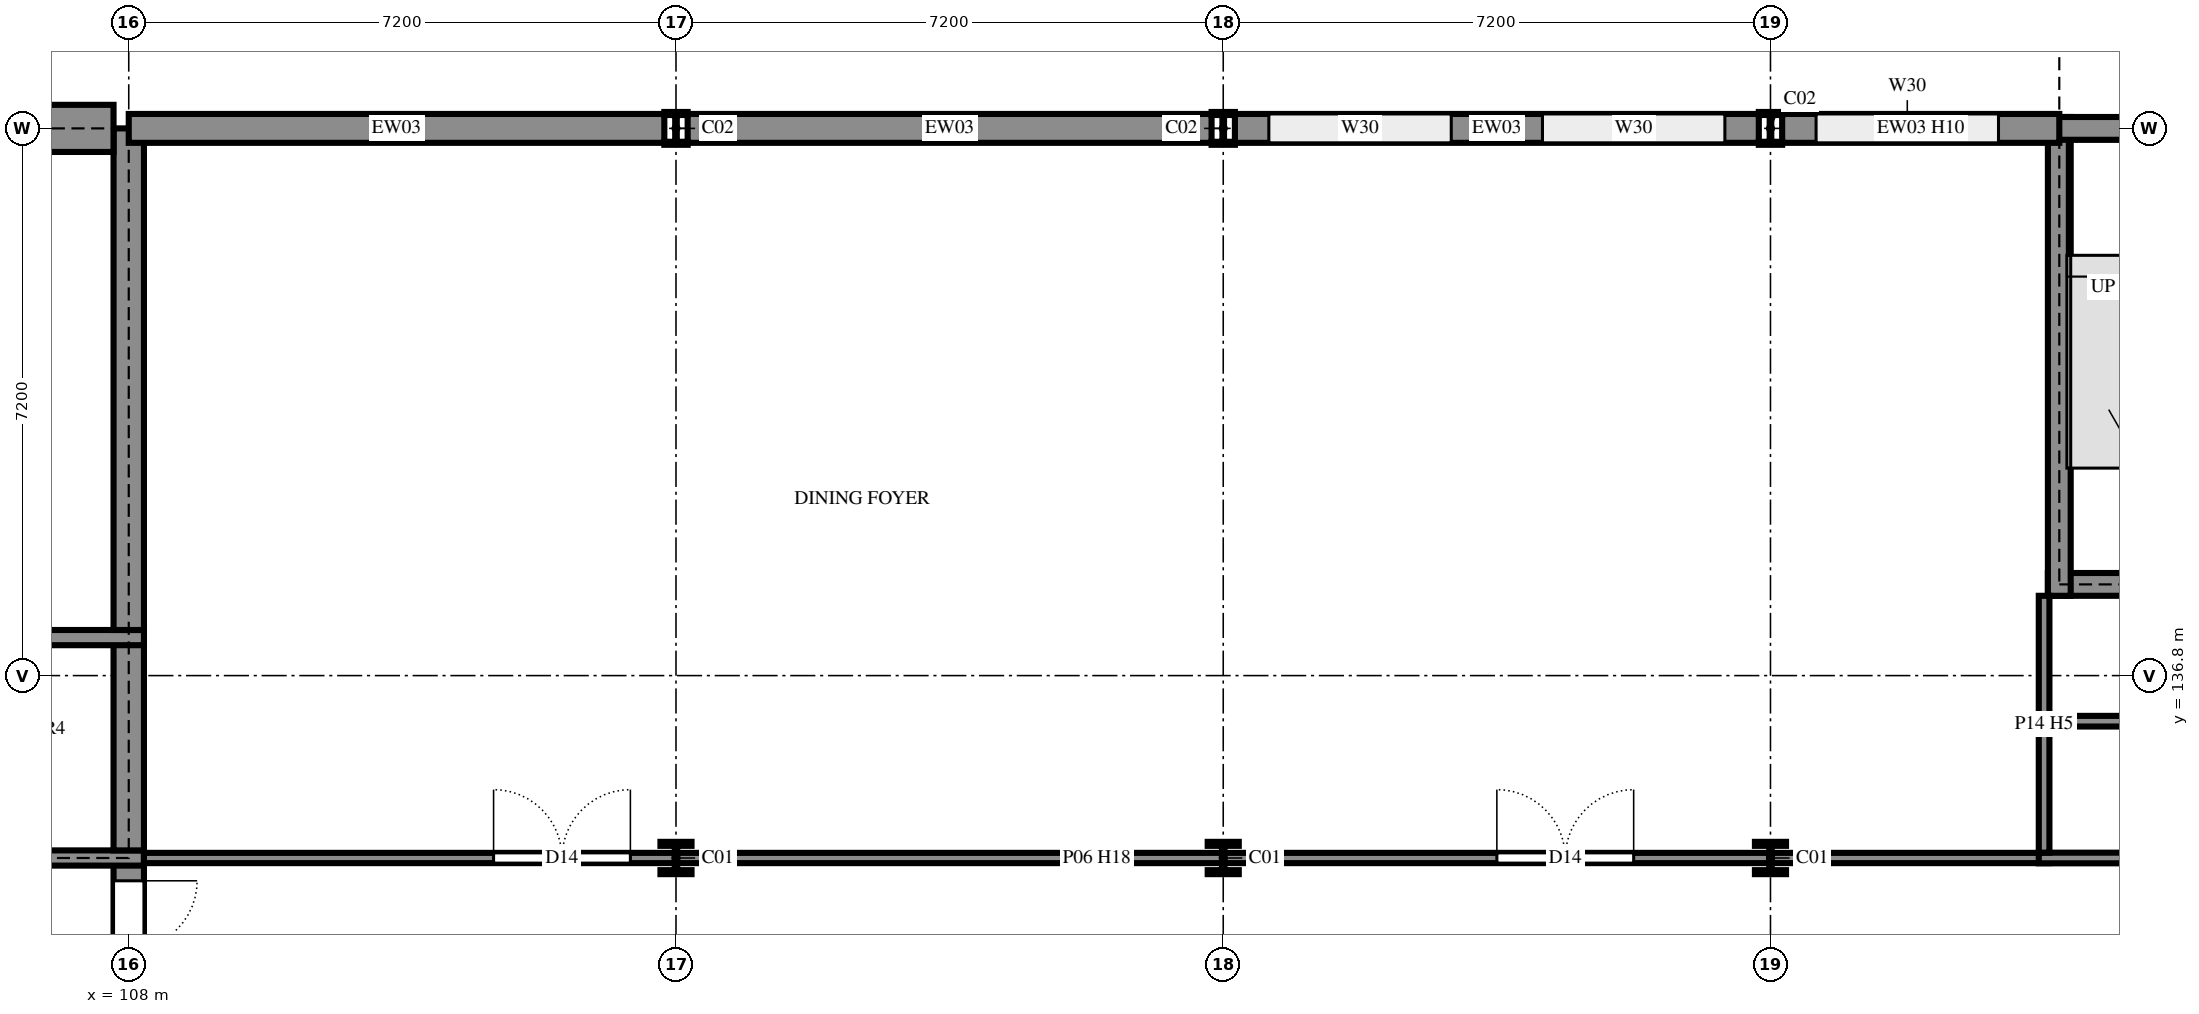
"""IFC4 building model, lengths in metres.
Left out: names, types, materials, properties, quantities, classifications, styles, units other than length and angle.
Written with IfcOpenShell. Run it as: python <this file> out.ifc"""

import sys

from ifc_helpers import new_model, si_unit, direction, frame, frame_2d, origin, origin_2d, place, context, subcontext, project, spatial, rectangle, i_section, extrude, element, fill, save


model = new_model("IFC4")
c1 = context("Model", 3, precision=1e-05, world=origin(), true_north=direction((0.0, 1.0)))
c2 = subcontext(c1, "Body", "Model", "MODEL_VIEW")
j1 = project(units=[si_unit("LENGTHUNIT", "METRE"), si_unit("PLANEANGLEUNIT", "RADIAN")], contexts=[c1])
p1 = place(None, origin())
s1 = spatial("IfcSite", under=j1, at=p1, CompositionType="ELEMENT")
p2 = place(p1, origin())
s2 = spatial("IfcBuilding", under=s1, at=p2, CompositionType="ELEMENT")
p3 = place(p2, frame((0.0, 0.0, 10.8)))
s3 = spatial("IfcBuildingStorey", under=s2, at=p3, CompositionType="ELEMENT", Elevation=10.8)
p4 = place(p3, frame((115.2, 134.4, 0.0), z_axis=(0.0, 0.0, 1.0), x_axis=(1.0, 0.0, 0.0)))
e1 = element("IfcColumn", 1, at=p4, inside=s3, PredefinedType="COLUMN", context=c2, shape_type="SweptSolid", body=[
    extrude(i_section(OverallWidth=0.409, OverallDepth=0.425, WebThickness=0.033, FlangeThickness=0.052, FilletRadius=0.015, at=origin_2d()), origin(), (0.0, 0.0, 1.0), 3.6),
])
p5 = place(p3, frame((115.2, 144.0, 0.0), z_axis=(0.0, 0.0, 1.0), x_axis=(1.0, 0.0, 0.0)))
e2 = element("IfcColumn", 2, at=p5, inside=s3, PredefinedType="COLUMN", context=c2, shape_type="SweptSolid", body=[
    extrude(i_section(OverallWidth=0.307, OverallDepth=0.432, WebThickness=0.021, FlangeThickness=0.04, FilletRadius=0.027, at=origin_2d()), origin(), (0.0, 0.0, 1.0), 3.6),
])
p6 = place(p3, frame((122.4, 134.4, 0.0), z_axis=(0.0, 0.0, 1.0), x_axis=(1.0, 0.0, 0.0)))
e3 = element("IfcColumn", 3, at=p6, inside=s3, PredefinedType="COLUMN", context=c2, shape_type="SweptSolid", body=[
    extrude(i_section(OverallWidth=0.409, OverallDepth=0.425, WebThickness=0.033, FlangeThickness=0.052, FilletRadius=0.015, at=origin_2d()), origin(), (0.0, 0.0, 1.0), 3.6),
])
p7 = place(p3, frame((122.4, 144.0, 0.0), z_axis=(0.0, 0.0, 1.0), x_axis=(1.0, 0.0, 0.0)))
e4 = element("IfcColumn", 4, at=p7, inside=s3, PredefinedType="COLUMN", context=c2, shape_type="SweptSolid", body=[
    extrude(i_section(OverallWidth=0.307, OverallDepth=0.432, WebThickness=0.021, FlangeThickness=0.04, FilletRadius=0.027, at=origin_2d()), origin(), (0.0, 0.0, 1.0), 3.6),
])
p8 = place(p3, frame((129.6, 134.4, 0.0), z_axis=(0.0, 0.0, 1.0), x_axis=(1.0, 0.0, 0.0)))
e5 = element("IfcColumn", 5, at=p8, inside=s3, PredefinedType="COLUMN", context=c2, shape_type="SweptSolid", body=[
    extrude(i_section(OverallWidth=0.409, OverallDepth=0.425, WebThickness=0.033, FlangeThickness=0.052, FilletRadius=0.015, at=origin_2d()), origin(), (0.0, 0.0, 1.0), 3.6),
])
p9 = place(p3, frame((129.6, 144.0, 0.0), z_axis=(0.0, 0.0, 1.0), x_axis=(1.0, 0.0, 0.0)))
e6 = element("IfcColumn", 6, at=p9, inside=s3, PredefinedType="COLUMN", context=c2, shape_type="SweptSolid", body=[
    extrude(i_section(OverallWidth=0.307, OverallDepth=0.432, WebThickness=0.021, FlangeThickness=0.04, FilletRadius=0.027, at=origin_2d()), origin(), (0.0, 0.0, 1.0), 3.6),
])
p10 = place(p3, frame((108.0, 132.0, 0.0), z_axis=(0.0, 0.0, 1.0), x_axis=(0.0, 1.0, 0.0)))
e7 = element("IfcWall", 7, at=p10, inside=s3, PredefinedType="SHEAR", context=c2, shape_type="SweptSolid", body=[
    extrude(rectangle(XDim=2.5, YDim=0.4, at=frame_2d((1.25, 0.0))), origin(), (0.0, 0.0, 1.0), 3.6),
])
p11 = place(p10, frame((0.3, 0.0, 0.0)))
e8 = element("IfcOpeningElement", 8, at=p11, cuts=e7, PredefinedType="OPENING", context=c2, shape_type="SweptSolid", body=[
    extrude(rectangle(XDim=1.8, YDim=2.1, at=frame_2d((0.9, 1.05))), frame((0.0, 0.21, 0.0), z_axis=(0.0, -1.0, 0.0), x_axis=(1.0, 0.0, 0.0)), (0.0, 0.0, 1.0), 0.42),
])
p12 = place(p3, frame((104.1, 134.4, 0.0), z_axis=(0.0, 0.0, 1.0), x_axis=(1.0, 0.0, 0.0)))
e9 = element("IfcWall", 9, at=p12, inside=s3, PredefinedType="SHEAR", context=c2, shape_type="SweptSolid", body=[
    extrude(rectangle(XDim=4.1, YDim=0.2, at=frame_2d((2.05, 0.0))), origin(), (0.0, 0.0, 1.0), 3.6),
])
p13 = place(p12, frame((1.475, 0.0, 0.0)))
e10 = element("IfcOpeningElement", 10, at=p13, cuts=e9, PredefinedType="OPENING", context=c2, shape_type="SweptSolid", body=[
    extrude(rectangle(XDim=0.85, YDim=2.1, at=frame_2d((0.425, 1.05))), frame((0.0, 0.11, 0.0), z_axis=(0.0, -1.0, 0.0), x_axis=(1.0, 0.0, 0.0)), (0.0, 0.0, 1.0), 0.22),
])
p14 = place(p3, frame((108.0, 134.5, 0.0), z_axis=(0.0, 0.0, 1.0), x_axis=(0.0, 1.0, 0.0)))
e11 = element("IfcWall", 11, at=p14, inside=s3, PredefinedType="SHEAR", context=c2, shape_type="SweptSolid", body=[
    extrude(rectangle(XDim=2.9, YDim=0.4, at=frame_2d((1.45, 0.0))), origin(), (0.0, 0.0, 1.0), 3.6),
])
p15 = place(p3, frame((108.2, 137.3, 0.0), z_axis=(0.0, 0.0, 1.0), x_axis=(-1.0, 0.0, 0.0)))
e12 = element("IfcWall", 12, at=p15, inside=s3, PredefinedType="SHEAR", context=c2, shape_type="SweptSolid", body=[
    extrude(rectangle(XDim=4.1, YDim=0.2, at=frame_2d((2.05, 0.0))), origin(), (0.0, 0.0, 1.0), 3.6),
])
p16 = place(p3, frame((108.0, 137.4, 0.0), z_axis=(0.0, 0.0, 1.0), x_axis=(0.0, 1.0, 0.0)))
e13 = element("IfcWall", 13, at=p16, inside=s3, PredefinedType="SHEAR", context=c2, shape_type="SweptSolid", body=[
    extrude(rectangle(XDim=6.6, YDim=0.4, at=frame_2d((3.3, 0.0))), origin(), (0.0, 0.0, 1.0), 3.6),
])
p17 = place(p3, frame((133.25, 138.0, 0.0), z_axis=(0.0, 0.0, 1.0), x_axis=(1.0, 0.0, 0.0)))
e14 = element("IfcWall", 14, at=p17, inside=s3, PredefinedType="SHEAR", context=c2, shape_type="SweptSolid", body=[
    extrude(rectangle(XDim=3.7, YDim=0.3, at=frame_2d((1.85, 0.0))), origin(), (0.0, 0.0, 1.0), 3.6),
])
p18 = place(p17, frame((1.25, 0.0, 0.0)))
e15 = element("IfcOpeningElement", 15, at=p18, cuts=e14, PredefinedType="OPENING", context=c2, shape_type="SweptSolid", body=[
    extrude(rectangle(XDim=1.0, YDim=2.1, at=frame_2d((0.5, 1.05))), frame((0.0, 0.16, 0.0), z_axis=(0.0, -1.0, 0.0), x_axis=(1.0, 0.0, 0.0)), (0.0, 0.0, 1.0), 0.32),
])
p19 = place(p3, frame((133.4, 144.15, 0.0), z_axis=(0.0, 0.0, 1.0), x_axis=(0.0, -1.0, 0.0)))
e16 = element("IfcWall", 16, at=p19, inside=s3, PredefinedType="SHEAR", context=c2, shape_type="SweptSolid", body=[
    extrude(rectangle(XDim=6.3, YDim=0.3, at=frame_2d((3.15, 0.0))), origin(), (0.0, 0.0, 1.0), 3.6),
])
p20 = place(p3, frame((136.95, 144.0, 0.0), z_axis=(0.0, 0.0, 1.0), x_axis=(-1.0, 0.0, 0.0)))
e17 = element("IfcWall", 17, at=p20, inside=s3, PredefinedType="SHEAR", context=c2, shape_type="SweptSolid", body=[
    extrude(rectangle(XDim=3.7, YDim=0.3, at=frame_2d((1.85, 0.0))), origin(), (0.0, 0.0, 1.0), 3.6),
])
p21 = place(p20, frame((1.25, 0.0, 0.6)))
e18 = element("IfcOpeningElement", 18, at=p21, cuts=e17, PredefinedType="OPENING", context=c2, shape_type="SweptSolid", body=[
    extrude(rectangle(XDim=0.9, YDim=2.1, at=frame_2d((0.45, 1.05))), frame((0.0, 0.16, 0.0), z_axis=(0.0, -1.0, 0.0), x_axis=(1.0, 0.0, 0.0)), (0.0, 0.0, 1.0), 0.32),
])
p22 = place(p3, frame((133.4, 144.0, 0.0), z_axis=(0.0, 0.0, 1.0), x_axis=(-1.0, 0.0, 0.0)))
e19 = element("IfcWall", 19, at=p22, inside=s3, PredefinedType="SOLIDWALL", context=c2, shape_type="SweptSolid", body=[
    extrude(rectangle(XDim=3.646, YDim=0.38, at=frame_2d((1.823, 0.0))), origin(), (0.0, 0.0, 1.0), 3.26),
])
p23 = place(p22, frame((0.8, 0.0, 0.6)))
e20 = element("IfcOpeningElement", 20, at=p23, cuts=e19, PredefinedType="OPENING", context=c2, shape_type="SweptSolid", body=[
    extrude(rectangle(XDim=2.4, YDim=2.4, at=frame_2d((1.2, 1.2))), frame((0.0, 0.2, 0.0), z_axis=(0.0, -1.0, 0.0), x_axis=(1.0, 0.0, 0.0)), (0.0, 0.0, 1.0), 0.4),
])
p24 = place(p3, frame((129.447, 144.0, 0.0), z_axis=(0.0, 0.0, 1.0), x_axis=(-1.0, 0.0, 0.0)))
e21 = element("IfcWall", 21, at=p24, inside=s3, PredefinedType="SOLIDWALL", context=c2, shape_type="SweptSolid", body=[
    extrude(rectangle(XDim=6.893, YDim=0.38, at=frame_2d((3.447, 0.0))), origin(), (0.0, 0.0, 1.0), 3.16),
])
p25 = place(p24, frame((4.046, 0.0, 0.6)))
e22 = element("IfcOpeningElement", 22, at=p25, cuts=e21, PredefinedType="OPENING", context=c2, shape_type="SweptSolid", body=[
    extrude(rectangle(XDim=2.4, YDim=2.4, at=frame_2d((1.2, 1.2))), frame((0.0, 0.2, 0.0), z_axis=(0.0, -1.0, 0.0), x_axis=(1.0, 0.0, 0.0)), (0.0, 0.0, 1.0), 0.4),
])
p26 = place(p24, frame((0.447, 0.0, 0.6)))
e23 = element("IfcOpeningElement", 23, at=p26, cuts=e21, PredefinedType="OPENING", context=c2, shape_type="SweptSolid", body=[
    extrude(rectangle(XDim=2.4, YDim=2.4, at=frame_2d((1.2, 1.2))), frame((0.0, 0.2, 0.0), z_axis=(0.0, -1.0, 0.0), x_axis=(1.0, 0.0, 0.0)), (0.0, 0.0, 1.0), 0.4),
])
p27 = place(p3, frame((122.247, 144.0, 0.0), z_axis=(0.0, 0.0, 1.0), x_axis=(-1.0, 0.0, 0.0)))
e24 = element("IfcWall", 24, at=p27, inside=s3, PredefinedType="SOLIDWALL", context=c2, shape_type="SweptSolid", body=[
    extrude(rectangle(XDim=6.893, YDim=0.38, at=frame_2d((3.447, 0.0))), origin(), (0.0, 0.0, 1.0), 3.16),
])
p28 = place(p3, frame((115.046, 144.0, 0.0), z_axis=(0.0, 0.0, 1.0), x_axis=(-1.0, 0.0, 0.0)))
e25 = element("IfcWall", 25, at=p28, inside=s3, PredefinedType="SOLIDWALL", context=c2, shape_type="SweptSolid", body=[
    extrude(rectangle(XDim=7.046, YDim=0.38, at=frame_2d((3.523, 0.0))), origin(), (0.0, 0.0, 1.0), 3.16),
])
p29 = place(p3, frame((107.8, 144.0, 0.0), z_axis=(0.0, 0.0, 1.0), x_axis=(-1.0, 0.0, 0.0)))
e26 = element("IfcWall", 26, at=p29, inside=s3, PredefinedType="SOLIDWALL", context=c2, shape_type="SweptSolid", body=[
    extrude(rectangle(XDim=1.2, YDim=0.62, at=frame_2d((0.6, 0.0))), origin(), (0.0, 0.0, 1.0), 3.46),
])
p30 = place(p3, frame((108.2, 134.4, 0.0), z_axis=(0.0, 0.0, 1.0), x_axis=(1.0, 0.0, 0.0)))
e27 = element("IfcWall", 27, at=p30, inside=s3, PredefinedType="PARTITIONING", context=c2, shape_type="SweptSolid", body=[
    extrude(rectangle(XDim=25.07, YDim=0.135, at=frame_2d((12.535, 0.0))), origin(), (0.0, 0.0, 1.0), 3.159),
])
p31 = place(p30, frame((4.6, 0.0, 0.0)))
e28 = element("IfcOpeningElement", 28, at=p31, cuts=e27, PredefinedType="OPENING", context=c2, shape_type="SweptSolid", body=[
    extrude(rectangle(XDim=1.8, YDim=2.1, at=frame_2d((0.9, 1.05))), frame((0.0, 0.077, 0.0), z_axis=(0.0, -1.0, 0.0), x_axis=(1.0, 0.0, 0.0)), (0.0, 0.0, 1.0), 0.155),
])
p32 = place(p30, frame((17.8, 0.0, 0.0)))
e29 = element("IfcOpeningElement", 29, at=p32, cuts=e27, PredefinedType="OPENING", context=c2, shape_type="SweptSolid", body=[
    extrude(rectangle(XDim=1.8, YDim=2.1, at=frame_2d((0.9, 1.05))), frame((0.0, 0.077, 0.0), z_axis=(0.0, -1.0, 0.0), x_axis=(1.0, 0.0, 0.0)), (0.0, 0.0, 1.0), 0.155),
])
p33 = place(p3, frame((133.13, 134.4, 0.0), z_axis=(0.0, 0.0, 1.0), x_axis=(1.0, 0.0, 0.0)))
e30 = element("IfcWall", 30, at=p33, inside=s3, PredefinedType="PARTITIONING", context=c2, shape_type="SweptSolid", body=[
    extrude(rectangle(XDim=3.48, YDim=0.14, at=frame_2d((1.74, 0.0))), origin(), (0.0, 0.0, 1.0), 3.159),
])
p34 = place(p33, frame((1.37, 0.0, 0.0)))
e31 = element("IfcOpeningElement", 31, at=p34, cuts=e30, PredefinedType="OPENING", context=c2, shape_type="SweptSolid", body=[
    extrude(rectangle(XDim=1.0, YDim=2.1, at=frame_2d((0.5, 1.05))), frame((0.0, 0.08, 0.0), z_axis=(0.0, -1.0, 0.0), x_axis=(1.0, 0.0, 0.0)), (0.0, 0.0, 1.0), 0.16),
])
p35 = place(p3, frame((133.27, 136.2, 0.0), z_axis=(0.0, 0.0, 1.0), x_axis=(1.0, 0.0, 0.0)))
e32 = element("IfcWall", 32, at=p35, inside=s3, PredefinedType="PARTITIONING", context=c2, shape_type="SweptSolid", body=[
    extrude(rectangle(XDim=3.34, YDim=0.14, at=frame_2d((1.67, 0.0))), origin(), (0.0, 0.0, 1.0), 3.42),
])
p36 = place(p35, frame((1.23, 0.0, 0.0)))
e33 = element("IfcOpeningElement", 33, at=p36, cuts=e32, PredefinedType="OPENING", context=c2, shape_type="SweptSolid", body=[
    extrude(rectangle(XDim=1.0, YDim=2.1, at=frame_2d((0.5, 1.05))), frame((0.0, 0.08, 0.0), z_axis=(0.0, -1.0, 0.0), x_axis=(1.0, 0.0, 0.0)), (0.0, 0.0, 1.0), 0.16),
])
p37 = place(p3, frame((133.2, 134.47, 0.0), z_axis=(0.0, 0.0, 1.0), x_axis=(0.0, 1.0, 0.0)))
e34 = element("IfcWall", 34, at=p37, inside=s3, PredefinedType="PARTITIONING", context=c2, shape_type="SweptSolid", body=[
    extrude(rectangle(XDim=3.38, YDim=0.14, at=frame_2d((1.69, 0.0))), origin(), (0.0, 0.0, 1.0), 3.06),
])
p38 = place(p23, origin())
e35 = element("IfcWindow", 35, at=p38, inside=s3, PartitioningType="SINGLE_PANEL", PredefinedType="WINDOW", context=c2, shape_type="SweptSolid", body=[
    extrude(rectangle(XDim=2.4, YDim=2.4, at=frame_2d((1.2, 1.2))), frame((0.0, 0.03, 0.0), z_axis=(0.0, -1.0, 0.0), x_axis=(1.0, 0.0, 0.0)), (0.0, 0.0, 1.0), 0.06),
])
fill(e20, e35)
p39 = place(p25, origin())
e36 = element("IfcWindow", 36, at=p39, inside=s3, PartitioningType="SINGLE_PANEL", PredefinedType="WINDOW", context=c2, shape_type="SweptSolid", body=[
    extrude(rectangle(XDim=2.4, YDim=2.4, at=frame_2d((1.2, 1.2))), frame((0.0, 0.03, 0.0), z_axis=(0.0, -1.0, 0.0), x_axis=(1.0, 0.0, 0.0)), (0.0, 0.0, 1.0), 0.06),
])
fill(e22, e36)
p40 = place(p26, origin())
e37 = element("IfcWindow", 37, at=p40, inside=s3, PartitioningType="SINGLE_PANEL", PredefinedType="WINDOW", context=c2, shape_type="SweptSolid", body=[
    extrude(rectangle(XDim=2.4, YDim=2.4, at=frame_2d((1.2, 1.2))), frame((0.0, 0.03, 0.0), z_axis=(0.0, -1.0, 0.0), x_axis=(1.0, 0.0, 0.0)), (0.0, 0.0, 1.0), 0.06),
])
fill(e23, e37)
p41 = place(p31, origin())
e38 = element("IfcDoor", 38, at=p41, inside=s3, OperationType="DOUBLE_DOOR_SINGLE_SWING", PredefinedType="DOOR", context=c2, shape_type="SweptSolid", body=[
    extrude(rectangle(XDim=1.8, YDim=2.1, at=frame_2d((0.9, 1.05))), frame((0.0, 0.025, 0.0), z_axis=(0.0, -1.0, 0.0), x_axis=(1.0, 0.0, 0.0)), (0.0, 0.0, 1.0), 0.05),
])
fill(e28, e38)
p42 = place(p32, origin())
e39 = element("IfcDoor", 39, at=p42, inside=s3, OperationType="DOUBLE_DOOR_SINGLE_SWING", PredefinedType="DOOR", context=c2, shape_type="SweptSolid", body=[
    extrude(rectangle(XDim=1.8, YDim=2.1, at=frame_2d((0.9, 1.05))), frame((0.0, 0.025, 0.0), z_axis=(0.0, -1.0, 0.0), x_axis=(1.0, 0.0, 0.0)), (0.0, 0.0, 1.0), 0.05),
])
fill(e29, e39)
p43 = place(p11, frame((1.8, 0.0, 0.0), z_axis=(0.0, 0.0, 1.0), x_axis=(-1.0, 0.0, 0.0)))
e40 = element("IfcDoor", 40, at=p43, inside=s3, OperationType="DOUBLE_DOOR_SINGLE_SWING", PredefinedType="DOOR", context=c2, shape_type="SweptSolid", body=[
    extrude(rectangle(XDim=1.8, YDim=2.1, at=frame_2d((0.9, 1.05))), frame((0.0, 0.025, 0.0), z_axis=(0.0, -1.0, 0.0), x_axis=(1.0, 0.0, 0.0)), (0.0, 0.0, 1.0), 0.05),
])
fill(e8, e40)
save(model, sys.argv[1])
